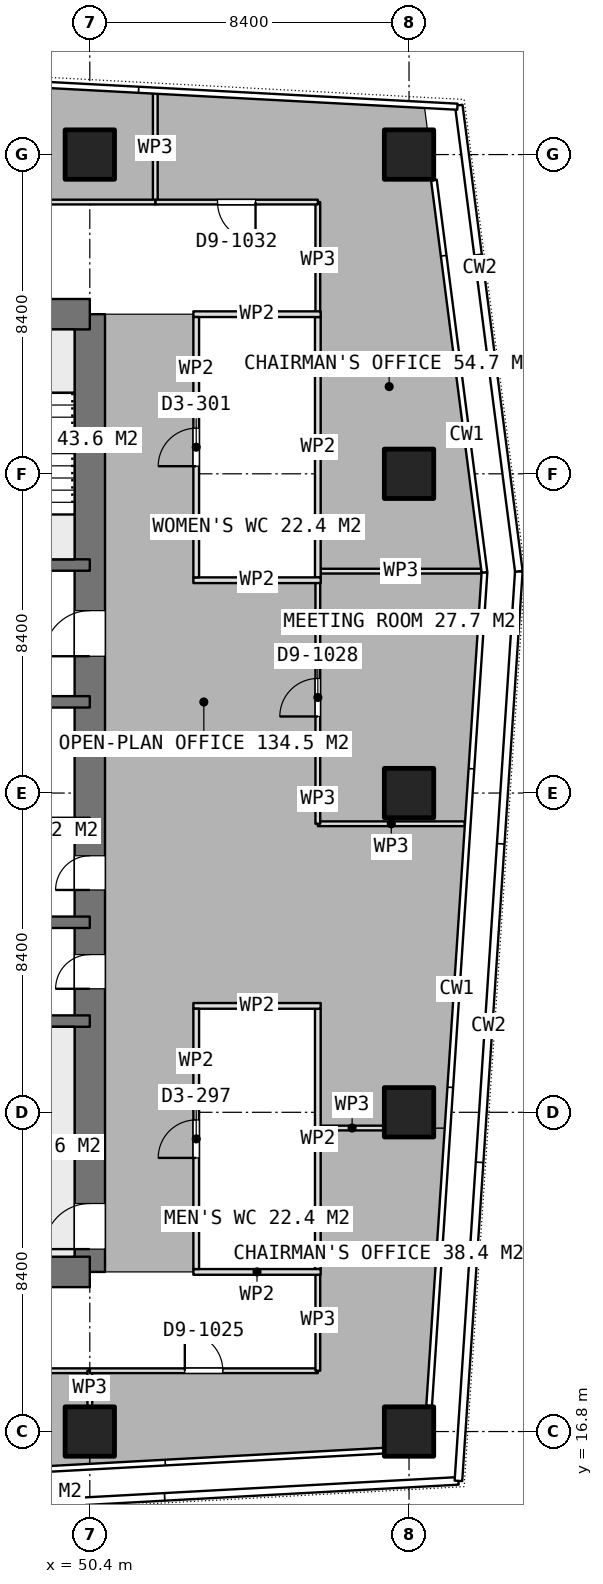
"""IFC4 building model, lengths in metres.
Left out: names, types, materials, properties, quantities, classifications, styles, units other than length and angle.
Written with IfcOpenShell. Run it as: python <this file> out.ifc"""

import sys

from ifc_helpers import new_model, si_unit, direction, frame, frame_2d, origin, origin_2d, place, context, subcontext, project, spatial, rectangle, extrude, element, fill, save


model = new_model("IFC4")
c1 = context("Model", 3, precision=1e-05, world=origin(), true_north=direction((0.0, 1.0)))
c2 = subcontext(c1, "Body", "Model", "MODEL_VIEW")
j1 = project(units=[si_unit("LENGTHUNIT", "METRE"), si_unit("PLANEANGLEUNIT", "RADIAN")], contexts=[c1])
p1 = place(None, origin())
s1 = spatial("IfcSite", under=j1, at=p1, CompositionType="ELEMENT")
p2 = place(p1, origin())
s2 = spatial("IfcBuilding", under=s1, at=p2, CompositionType="ELEMENT")
p3 = place(p2, frame((0.0, 0.0, 276.35)))
s3 = spatial("IfcBuildingStorey", under=s2, at=p3, CompositionType="ELEMENT", Elevation=276.35)
for number, where, z_axis, x_axis in (
    (1, (40.0, 21.0, 0.0), (0.0, 0.0, 1.0), (1.0, 0.0, 0.0)),
    (2, (40.0, 46.2, 0.0), (0.0, 0.0, 1.0), (1.0, 0.0, 0.0)),
):
    element("IfcWall", number, at=place(p3, frame(where, z_axis=z_axis, x_axis=x_axis)), inside=s3, PredefinedType="SHEAR", context=c2, shape_type="SweptSolid", body=[
        extrude(rectangle(XDim=10.4, YDim=0.8, at=frame_2d((5.2, 0.0))), origin(), (0.0, 0.0, 1.0), 3.75),
    ])
p4 = place(p3, frame((50.4, 21.0, 0.0), z_axis=(0.0, 0.0, 1.0), x_axis=(0.0, 1.0, 0.0)))
e3 = element("IfcWall", 3, at=p4, inside=s3, PredefinedType="SHEAR", context=c2, shape_type="SweptSolid", body=[
    extrude(rectangle(XDim=25.2, YDim=0.8, at=frame_2d((12.6, 0.0))), origin(), (0.0, 0.0, 1.0), 3.75),
])
p5 = place(p4, frame((16.2, 0.0, 0.0)))
e4 = element("IfcOpeningElement", 4, at=p5, cuts=e3, PredefinedType="OPENING", context=c2, shape_type="SweptSolid", body=[
    extrude(rectangle(XDim=1.2, YDim=2.1, at=frame_2d((0.6, 1.05))), frame((0.0, 0.41, 0.0), z_axis=(0.0, -1.0, 0.0), x_axis=(1.0, 0.0, 0.0)), (0.0, 0.0, 1.0), 0.82),
])
p6 = place(p4, frame((10.05, 0.0, 0.0)))
e5 = element("IfcOpeningElement", 5, at=p6, cuts=e3, PredefinedType="OPENING", context=c2, shape_type="SweptSolid", body=[
    extrude(rectangle(XDim=0.9, YDim=2.1, at=frame_2d((0.45, 1.05))), frame((0.0, 0.41, 0.0), z_axis=(0.0, -1.0, 0.0), x_axis=(1.0, 0.0, 0.0)), (0.0, 0.0, 1.0), 0.82),
])
p7 = place(p4, frame((7.45, 0.0, 0.0)))
e6 = element("IfcOpeningElement", 6, at=p7, cuts=e3, PredefinedType="OPENING", context=c2, shape_type="SweptSolid", body=[
    extrude(rectangle(XDim=0.9, YDim=2.1, at=frame_2d((0.45, 1.05))), frame((0.0, 0.41, 0.0), z_axis=(0.0, -1.0, 0.0), x_axis=(1.0, 0.0, 0.0)), (0.0, 0.0, 1.0), 0.82),
])
p8 = place(p4, frame((0.6, 0.0, 0.0)))
e7 = element("IfcOpeningElement", 7, at=p8, cuts=e3, PredefinedType="OPENING", context=c2, shape_type="SweptSolid", body=[
    extrude(rectangle(XDim=1.2, YDim=2.1, at=frame_2d((0.6, 1.05))), frame((0.0, 0.41, 0.0), z_axis=(0.0, -1.0, 0.0), x_axis=(1.0, 0.0, 0.0)), (0.0, 0.0, 1.0), 0.82),
])
for number, where, z_axis, x_axis in (
    (8, (43.8, 27.6, 0.0), (0.0, 0.0, 1.0), (1.0, 0.0, 0.0)),
    (9, (43.8, 30.2, 0.0), (0.0, 0.0, 1.0), (1.0, 0.0, 0.0)),
    (10, (43.8, 32.8, 0.0), (0.0, 0.0, 1.0), (1.0, 0.0, 0.0)),
):
    element("IfcWall", number, at=place(p3, frame(where, z_axis=z_axis, x_axis=x_axis)), inside=s3, PredefinedType="SHEAR", context=c2, shape_type="SweptSolid", body=[
        extrude(rectangle(XDim=6.6, YDim=0.3, at=frame_2d((3.3, 0.0))), origin(), (0.0, 0.0, 1.0), 3.75),
    ])
p9 = place(p3, frame((43.8, 36.0, 0.0), z_axis=(0.0, 0.0, 1.0), x_axis=(1.0, 0.0, 0.0)))
e11 = element("IfcWall", 11, at=p9, inside=s3, PredefinedType="SHEAR", context=c2, shape_type="SweptSolid", body=[
    extrude(rectangle(XDim=6.6, YDim=0.3, at=frame_2d((3.3, 0.0))), origin(), (0.0, 0.0, 1.0), 3.75),
])
p10 = place(p9, frame((2.65, 0.0, 0.0)))
e12 = element("IfcOpeningElement", 12, at=p10, cuts=e11, PredefinedType="OPENING", context=c2, shape_type="SweptSolid", body=[
    extrude(rectangle(XDim=1.3, YDim=2.1, at=frame_2d((0.65, 1.05))), frame((0.0, 0.16, 0.0), z_axis=(0.0, -1.0, 0.0), x_axis=(1.0, 0.0, 0.0)), (0.0, 0.0, 1.0), 0.32),
])
p11 = place(p3, frame((43.8, 39.6, 0.0), z_axis=(0.0, 0.0, 1.0), x_axis=(1.0, 0.0, 0.0)))
e13 = element("IfcWall", 13, at=p11, inside=s3, PredefinedType="SHEAR", context=c2, shape_type="SweptSolid", body=[
    extrude(rectangle(XDim=6.6, YDim=0.3, at=frame_2d((3.3, 0.0))), origin(), (0.0, 0.0, 1.0), 3.75),
])
p12 = place(p11, frame((0.35, 0.0, 0.0)))
e14 = element("IfcOpeningElement", 14, at=p12, cuts=e13, PredefinedType="OPENING", context=c2, shape_type="SweptSolid", body=[
    extrude(rectangle(XDim=1.2, YDim=2.1, at=frame_2d((0.6, 1.05))), frame((0.0, 0.16, 0.0), z_axis=(0.0, -1.0, 0.0), x_axis=(1.0, 0.0, 0.0)), (0.0, 0.0, 1.0), 0.32),
])
for number, where, z_axis, x_axis in (
    (15, (50.4, 16.8, 0.0), (0.0, 0.0, 1.0), (1.0, 0.0, 0.0)),
    (16, (50.4, 50.4, 0.0), (0.0, 0.0, 1.0), (1.0, 0.0, 0.0)),
    (17, (58.8, 16.8, 0.0), (0.0, 0.0, 1.0), (1.0, 0.0, 0.0)),
    (18, (58.8, 25.2, 0.0), (0.0, 0.0, 1.0), (1.0, 0.0, 0.0)),
    (19, (58.8, 33.6, 0.0), (0.0, 0.0, 1.0), (1.0, 0.0, 0.0)),
    (20, (58.8, 42.0, 0.0), (0.0, 0.0, 1.0), (1.0, 0.0, 0.0)),
    (21, (58.8, 50.4, 0.0), (0.0, 0.0, 1.0), (1.0, 0.0, 0.0)),
):
    element("IfcColumn", number, at=place(p3, frame(where, z_axis=z_axis, x_axis=x_axis)), inside=s3, PredefinedType="COLUMN", context=c2, shape_type="SweptSolid", body=[
        extrude(rectangle(XDim=1.3, YDim=1.3, at=origin_2d()), origin(), (0.0, 0.0, 1.0), 3.75),
    ])
for number, where, z_axis, x_axis in (
    (22, (53.125, 39.2, 0.0), (0.0, 0.0, 1.0), (1.0, 0.0, 0.0)),
    (23, (53.125, 46.2, 0.0), (0.0, 0.0, 1.0), (1.0, 0.0, 0.0)),
):
    element("IfcWall", number, at=place(p3, frame(where, z_axis=z_axis, x_axis=x_axis)), inside=s3, PredefinedType="PARTITIONING", context=c2, shape_type="SweptSolid", body=[
        extrude(rectangle(XDim=3.35, YDim=0.15, at=frame_2d((1.675, 0.0))), origin(), (0.0, 0.0, 1.0), 3.5),
    ])
p13 = place(p3, frame((53.2, 39.275, 0.0), z_axis=(0.0, 0.0, 1.0), x_axis=(0.0, 1.0, 0.0)))
e24 = element("IfcWall", 24, at=p13, inside=s3, PredefinedType="PARTITIONING", context=c2, shape_type="SweptSolid", body=[
    extrude(rectangle(XDim=6.85, YDim=0.15, at=frame_2d((3.425, 0.0))), origin(), (0.0, 0.0, 1.0), 3.5),
])
p14 = place(p13, frame((2.925, 0.0, 0.0)))
e25 = element("IfcOpeningElement", 25, at=p14, cuts=e24, PredefinedType="OPENING", context=c2, shape_type="SweptSolid", body=[
    extrude(rectangle(XDim=1.0, YDim=2.1, at=frame_2d((0.5, 1.05))), frame((0.0, 0.085, 0.0), z_axis=(0.0, -1.0, 0.0), x_axis=(1.0, 0.0, 0.0)), (0.0, 0.0, 1.0), 0.17),
])
p15 = place(p3, frame((56.4, 39.275, 0.0), z_axis=(0.0, 0.0, 1.0), x_axis=(0.0, 1.0, 0.0)))
e26 = element("IfcWall", 26, at=p15, inside=s3, PredefinedType="PARTITIONING", context=c2, shape_type="SweptSolid", body=[
    extrude(rectangle(XDim=6.85, YDim=0.15, at=frame_2d((3.425, 0.0))), origin(), (0.0, 0.0, 1.0), 3.5),
])
for number, where, z_axis, x_axis in (
    (27, (53.125, 21.0, 0.0), (0.0, 0.0, 1.0), (1.0, 0.0, 0.0)),
    (28, (53.125, 28.0, 0.0), (0.0, 0.0, 1.0), (1.0, 0.0, 0.0)),
):
    element("IfcWall", number, at=place(p3, frame(where, z_axis=z_axis, x_axis=x_axis)), inside=s3, PredefinedType="PARTITIONING", context=c2, shape_type="SweptSolid", body=[
        extrude(rectangle(XDim=3.35, YDim=0.15, at=frame_2d((1.675, 0.0))), origin(), (0.0, 0.0, 1.0), 3.5),
    ])
p16 = place(p3, frame((53.2, 21.075, 0.0), z_axis=(0.0, 0.0, 1.0), x_axis=(0.0, 1.0, 0.0)))
e29 = element("IfcWall", 29, at=p16, inside=s3, PredefinedType="PARTITIONING", context=c2, shape_type="SweptSolid", body=[
    extrude(rectangle(XDim=6.85, YDim=0.15, at=frame_2d((3.425, 0.0))), origin(), (0.0, 0.0, 1.0), 3.5),
])
p17 = place(p16, frame((2.925, 0.0, 0.0)))
e30 = element("IfcOpeningElement", 30, at=p17, cuts=e29, PredefinedType="OPENING", context=c2, shape_type="SweptSolid", body=[
    extrude(rectangle(XDim=1.0, YDim=2.1, at=frame_2d((0.5, 1.05))), frame((0.0, 0.085, 0.0), z_axis=(0.0, -1.0, 0.0), x_axis=(1.0, 0.0, 0.0)), (0.0, 0.0, 1.0), 0.17),
])
p18 = place(p3, frame((56.4, 21.075, 0.0), z_axis=(0.0, 0.0, 1.0), x_axis=(0.0, 1.0, 0.0)))
e31 = element("IfcWall", 31, at=p18, inside=s3, PredefinedType="PARTITIONING", context=c2, shape_type="SweptSolid", body=[
    extrude(rectangle(XDim=6.85, YDim=0.15, at=frame_2d((3.425, 0.0))), origin(), (0.0, 0.0, 1.0), 3.5),
])
p19 = place(p3, frame((60.266, 32.792, 0.0), z_axis=(0.0, 0.0, 1.0), x_axis=(-1.0, 0.0, 0.0)))
e32 = element("IfcWall", 32, at=p19, inside=s3, PredefinedType="PARTITIONING", context=c2, shape_type="SweptSolid", body=[
    extrude(rectangle(XDim=3.866, YDim=0.125, at=frame_2d((1.933, 0.0))), origin(), (0.0, 0.0, 1.0), 3.5),
])
p20 = place(p3, frame((56.4, 32.792, 0.0), z_axis=(0.0, 0.0, 1.0), x_axis=(0.0, 1.0, 0.0)))
e33 = element("IfcWall", 33, at=p20, inside=s3, PredefinedType="PARTITIONING", context=c2, shape_type="SweptSolid", body=[
    extrude(rectangle(XDim=6.482, YDim=0.125, at=frame_2d((3.241, 0.0))), origin(), (0.0, 0.0, 1.0), 3.5),
])
p21 = place(p20, frame((2.823, 0.0, 0.0)))
e34 = element("IfcOpeningElement", 34, at=p21, cuts=e33, PredefinedType="OPENING", context=c2, shape_type="SweptSolid", body=[
    extrude(rectangle(XDim=1.0, YDim=2.1, at=frame_2d((0.5, 1.05))), frame((0.0, 0.073, 0.0), z_axis=(0.0, -1.0, 0.0), x_axis=(1.0, 0.0, 0.0)), (0.0, 0.0, 1.0), 0.145),
])
p22 = place(p3, frame((56.475, 39.439, 0.0), z_axis=(0.0, 0.0, 1.0), x_axis=(1.0, 0.0, 0.0)))
e35 = element("IfcWall", 35, at=p22, inside=s3, PredefinedType="PARTITIONING", context=c2, shape_type="SweptSolid", body=[
    extrude(rectangle(XDim=4.225, YDim=0.125, at=frame_2d((2.112, 0.0))), origin(), (0.0, 0.0, 1.0), 3.5),
])
p23 = place(p3, frame((52.123, 49.15, 0.0), z_axis=(0.0, 0.0, 1.0), x_axis=(0.0, 1.0, 0.0)))
e36 = element("IfcWall", 36, at=p23, inside=s3, PredefinedType="PARTITIONING", context=c2, shape_type="SweptSolid", body=[
    extrude(rectangle(XDim=2.852, YDim=0.125, at=frame_2d((1.426, 0.0))), origin(), (0.0, 0.0, 1.0), 3.5),
])
p24 = place(p3, frame((56.4, 46.125, 0.0), z_axis=(0.0, 0.0, 1.0), x_axis=(0.0, 1.0, 0.0)))
e37 = element("IfcWall", 37, at=p24, inside=s3, PredefinedType="PARTITIONING", context=c2, shape_type="SweptSolid", body=[
    extrude(rectangle(XDim=3.025, YDim=0.125, at=frame_2d((1.512, 0.0))), origin(), (0.0, 0.0, 1.0), 3.5),
])
p25 = place(p3, frame((56.4, 49.15, 0.0), z_axis=(0.0, 0.0, 1.0), x_axis=(-1.0, 0.0, 0.0)))
e38 = element("IfcWall", 38, at=p25, inside=s3, PredefinedType="PARTITIONING", context=c2, shape_type="SweptSolid", body=[
    extrude(rectangle(XDim=4.277, YDim=0.125, at=frame_2d((2.138, 0.0))), origin(), (0.0, 0.0, 1.0), 3.5),
])
p26 = place(p25, frame((1.639, 0.0, 0.0)))
e39 = element("IfcOpeningElement", 39, at=p26, cuts=e38, PredefinedType="OPENING", context=c2, shape_type="SweptSolid", body=[
    extrude(rectangle(XDim=1.0, YDim=2.1, at=frame_2d((0.5, 1.05))), frame((0.0, 0.073, 0.0), z_axis=(0.0, -1.0, 0.0), x_axis=(1.0, 0.0, 0.0)), (0.0, 0.0, 1.0), 0.145),
])
p27 = place(p3, frame((52.123, 49.15, 0.0), z_axis=(0.0, 0.0, 1.0), x_axis=(-1.0, 0.0, 0.0)))
e40 = element("IfcWall", 40, at=p27, inside=s3, PredefinedType="PARTITIONING", context=c2, shape_type="SweptSolid", body=[
    extrude(rectangle(XDim=12.123, YDim=0.125, at=frame_2d((6.062, 0.0))), origin(), (0.0, 0.0, 1.0), 3.5),
])
p28 = place(p27, frame((5.162, 0.0, 0.0)))
e41 = element("IfcOpeningElement", 41, at=p28, cuts=e40, PredefinedType="OPENING", context=c2, shape_type="SweptSolid", body=[
    extrude(rectangle(XDim=1.8, YDim=2.1, at=frame_2d((0.9, 1.05))), frame((0.0, 0.073, 0.0), z_axis=(0.0, -1.0, 0.0), x_axis=(1.0, 0.0, 0.0)), (0.0, 0.0, 1.0), 0.145),
])
p29 = place(p3, frame((42.674, 18.4, 0.0), z_axis=(0.0, 0.0, 1.0), x_axis=(1.0, 0.0, 0.0)))
e42 = element("IfcWall", 42, at=p29, inside=s3, PredefinedType="PARTITIONING", context=c2, shape_type="SweptSolid", body=[
    extrude(rectangle(XDim=7.726, YDim=0.125, at=frame_2d((3.863, 0.0))), origin(), (0.0, 0.0, 1.0), 3.5),
])
p30 = place(p29, frame((3.363, 0.0, 0.0)))
e43 = element("IfcOpeningElement", 43, at=p30, cuts=e42, PredefinedType="OPENING", context=c2, shape_type="SweptSolid", body=[
    extrude(rectangle(XDim=1.0, YDim=2.1, at=frame_2d((0.5, 1.05))), frame((0.0, 0.073, 0.0), z_axis=(0.0, -1.0, 0.0), x_axis=(1.0, 0.0, 0.0)), (0.0, 0.0, 1.0), 0.145),
])
p31 = place(p3, frame((50.4, 18.4, 0.0), z_axis=(0.0, 0.0, 1.0), x_axis=(0.0, -1.0, 0.0)))
e44 = element("IfcWall", 44, at=p31, inside=s3, PredefinedType="PARTITIONING", context=c2, shape_type="SweptSolid", body=[
    extrude(rectangle(XDim=0.93, YDim=0.125, at=frame_2d((0.465, 0.0))), origin(), (0.0, 0.0, 1.0), 3.5),
])
p32 = place(p3, frame((56.475, 24.786, 0.0), z_axis=(0.0, 0.0, 1.0), x_axis=(1.0, 0.0, 0.0)))
e45 = element("IfcWall", 45, at=p32, inside=s3, PredefinedType="PARTITIONING", context=c2, shape_type="SweptSolid", body=[
    extrude(rectangle(XDim=1.655, YDim=0.125, at=frame_2d((0.827, 0.0))), origin(), (0.0, 0.0, 1.0), 3.5),
])
p33 = place(p3, frame((50.401, 18.4, 0.0), z_axis=(0.0, 0.0, 1.0), x_axis=(1.0, 0.0, 0.0)))
e46 = element("IfcWall", 46, at=p33, inside=s3, PredefinedType="PARTITIONING", context=c2, shape_type="SweptSolid", body=[
    extrude(rectangle(XDim=5.999, YDim=0.125, at=frame_2d((3.0, 0.0))), origin(), (0.0, 0.0, 1.0), 3.5),
])
p34 = place(p33, frame((2.499, 0.0, 0.0)))
e47 = element("IfcOpeningElement", 47, at=p34, cuts=e46, PredefinedType="OPENING", context=c2, shape_type="SweptSolid", body=[
    extrude(rectangle(XDim=1.0, YDim=2.1, at=frame_2d((0.5, 1.05))), frame((0.0, 0.073, 0.0), z_axis=(0.0, -1.0, 0.0), x_axis=(1.0, 0.0, 0.0)), (0.0, 0.0, 1.0), 0.145),
])
p35 = place(p3, frame((56.4, 18.4, 0.0), z_axis=(0.0, 0.0, 1.0), x_axis=(0.0, 1.0, 0.0)))
e48 = element("IfcWall", 48, at=p35, inside=s3, PredefinedType="PARTITIONING", context=c2, shape_type="SweptSolid", body=[
    extrude(rectangle(XDim=2.675, YDim=0.125, at=frame_2d((1.337, 0.0))), origin(), (0.0, 0.0, 1.0), 3.5),
])
p36 = place(p5, origin())
e49 = element("IfcDoor", 49, at=p36, inside=s3, OperationType="SINGLE_SWING_LEFT", PredefinedType="DOOR", context=c2, shape_type="SweptSolid", body=[
    extrude(rectangle(XDim=1.2, YDim=2.1, at=frame_2d((0.6, 1.05))), frame((0.0, 0.025, 0.0), z_axis=(0.0, -1.0, 0.0), x_axis=(1.0, 0.0, 0.0)), (0.0, 0.0, 1.0), 0.05),
])
fill(e4, e49)
p37 = place(p6, origin())
e50 = element("IfcDoor", 50, at=p37, inside=s3, OperationType="SINGLE_SWING_LEFT", PredefinedType="DOOR", context=c2, shape_type="SweptSolid", body=[
    extrude(rectangle(XDim=0.9, YDim=2.1, at=frame_2d((0.45, 1.05))), frame((0.0, 0.025, 0.0), z_axis=(0.0, -1.0, 0.0), x_axis=(1.0, 0.0, 0.0)), (0.0, 0.0, 1.0), 0.05),
])
fill(e5, e50)
p38 = place(p7, origin())
e51 = element("IfcDoor", 51, at=p38, inside=s3, OperationType="SINGLE_SWING_LEFT", PredefinedType="DOOR", context=c2, shape_type="SweptSolid", body=[
    extrude(rectangle(XDim=0.9, YDim=2.1, at=frame_2d((0.45, 1.05))), frame((0.0, 0.025, 0.0), z_axis=(0.0, -1.0, 0.0), x_axis=(1.0, 0.0, 0.0)), (0.0, 0.0, 1.0), 0.05),
])
fill(e6, e51)
p39 = place(p14, origin())
e52 = element("IfcDoor", 52, at=p39, inside=s3, OperationType="SINGLE_SWING_LEFT", PredefinedType="DOOR", context=c2, shape_type="SweptSolid", body=[
    extrude(rectangle(XDim=1.0, YDim=2.1, at=frame_2d((0.5, 1.05))), frame((0.0, 0.025, 0.0), z_axis=(0.0, -1.0, 0.0), x_axis=(1.0, 0.0, 0.0)), (0.0, 0.0, 1.0), 0.05),
])
fill(e25, e52)
p40 = place(p17, origin())
e53 = element("IfcDoor", 53, at=p40, inside=s3, OperationType="SINGLE_SWING_LEFT", PredefinedType="DOOR", context=c2, shape_type="SweptSolid", body=[
    extrude(rectangle(XDim=1.0, YDim=2.1, at=frame_2d((0.5, 1.05))), frame((0.0, 0.025, 0.0), z_axis=(0.0, -1.0, 0.0), x_axis=(1.0, 0.0, 0.0)), (0.0, 0.0, 1.0), 0.05),
])
fill(e30, e53)
p41 = place(p21, origin())
e54 = element("IfcDoor", 54, at=p41, inside=s3, OperationType="SINGLE_SWING_LEFT", PredefinedType="DOOR", context=c2, shape_type="SweptSolid", body=[
    extrude(rectangle(XDim=1.0, YDim=2.1, at=frame_2d((0.5, 1.05))), frame((0.0, 0.025, 0.0), z_axis=(0.0, -1.0, 0.0), x_axis=(1.0, 0.0, 0.0)), (0.0, 0.0, 1.0), 0.05),
])
fill(e34, e54)
p42 = place(p26, origin())
e55 = element("IfcDoor", 55, at=p42, inside=s3, OperationType="SINGLE_SWING_LEFT", PredefinedType="DOOR", context=c2, shape_type="SweptSolid", body=[
    extrude(rectangle(XDim=1.0, YDim=2.1, at=frame_2d((0.5, 1.05))), frame((0.0, 0.025, 0.0), z_axis=(0.0, -1.0, 0.0), x_axis=(1.0, 0.0, 0.0)), (0.0, 0.0, 1.0), 0.05),
])
fill(e39, e55)
p43 = place(p34, origin())
e56 = element("IfcDoor", 56, at=p43, inside=s3, OperationType="SINGLE_SWING_LEFT", PredefinedType="DOOR", context=c2, shape_type="SweptSolid", body=[
    extrude(rectangle(XDim=1.0, YDim=2.1, at=frame_2d((0.5, 1.05))), frame((0.0, 0.025, 0.0), z_axis=(0.0, -1.0, 0.0), x_axis=(1.0, 0.0, 0.0)), (0.0, 0.0, 1.0), 0.05),
])
fill(e47, e56)
p44 = place(p8, origin())
e57 = element("IfcDoor", 57, at=p44, inside=s3, OperationType="SINGLE_SWING_RIGHT", PredefinedType="DOOR", context=c2, shape_type="SweptSolid", body=[
    extrude(rectangle(XDim=1.2, YDim=2.1, at=frame_2d((0.6, 1.05))), frame((0.0, 0.025, 0.0), z_axis=(0.0, -1.0, 0.0), x_axis=(1.0, 0.0, 0.0)), (0.0, 0.0, 1.0), 0.05),
])
fill(e7, e57)
save(model, sys.argv[1])
